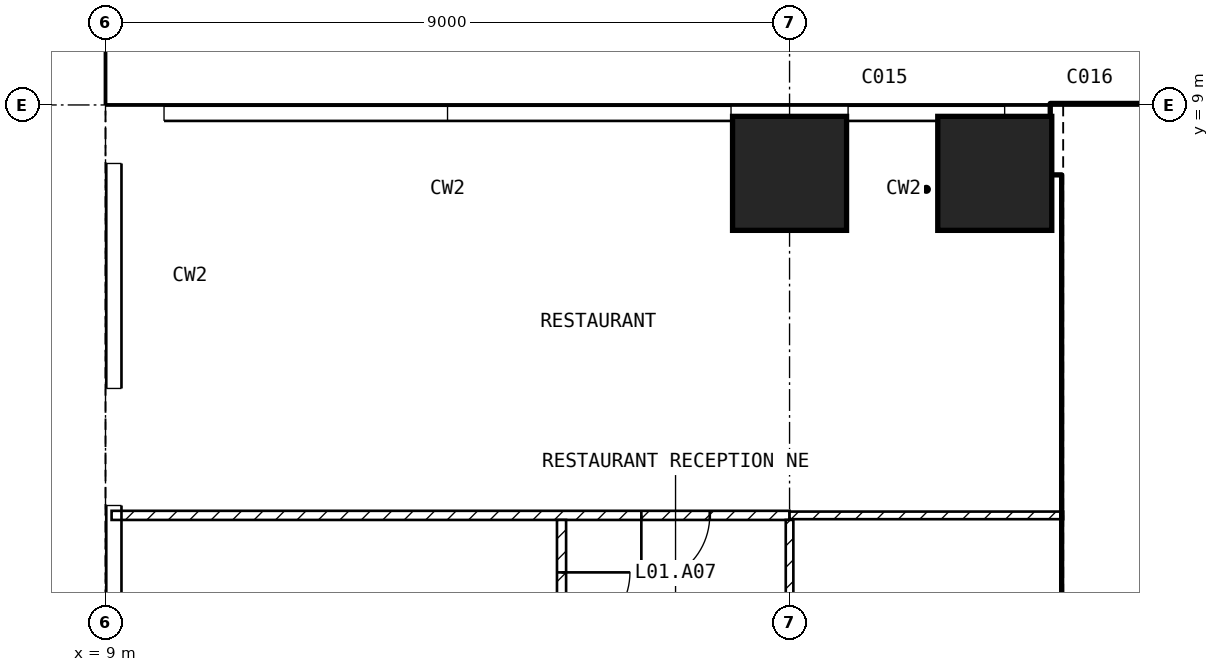
"""IFC4 building model, lengths in metres.
Left out: names, types, materials, properties, quantities, classifications, styles, units other than length and angle.
Written with IfcOpenShell. Run it as: python <this file> out.ifc"""

import sys

from ifc_helpers import new_model, si_unit, direction, frame, frame_2d, origin, origin_2d, place, context, subcontext, project, spatial, rectangle, extrude, element, fill, save


model = new_model("IFC4")
c1 = context("Model", 3, precision=1e-05, world=origin(), true_north=direction((0.0, 1.0)))
c2 = subcontext(c1, "Body", "Model", "MODEL_VIEW")
j1 = project(units=[si_unit("LENGTHUNIT", "METRE"), si_unit("PLANEANGLEUNIT", "RADIAN")], contexts=[c1])
p1 = place(None, origin())
s1 = spatial("IfcSite", under=j1, at=p1, CompositionType="ELEMENT")
p2 = place(p1, origin())
s2 = spatial("IfcBuilding", under=s1, at=p2, CompositionType="ELEMENT")
p3 = place(p2, origin())
s3 = spatial("IfcBuildingStorey", under=s2, at=p3, CompositionType="ELEMENT", Elevation=0.0)
p4 = place(p3, frame((7.65, -25.2, -0.4), z_axis=(0.0, 0.0, 1.0), x_axis=(0.0, 1.0, 0.0)))
e1 = element("IfcWall", 1, at=p4, inside=s3, PredefinedType="SOLIDWALL", context=c2, shape_type="SweptSolid", body=[
    extrude(rectangle(XDim=50.4, YDim=2.7, at=frame_2d((25.2, 0.0))), origin(), (0.0, 0.0, 1.0), 20.0),
])
p5 = place(p2, frame((0.0, 0.0, 15.0)))
s4 = spatial("IfcBuildingStorey", under=s2, at=p5, CompositionType="ELEMENT", Elevation=15.0)
for number, where, z_axis, x_axis in (
    (2, (18.0, 8.1, -0.3), (0.0, 0.0, 1.0), (1.0, 0.0, 0.0)),
    (3, (20.7, 8.1, -0.3), (0.0, 0.0, 1.0), (1.0, 0.0, 0.0)),
):
    element("IfcColumn", number, at=place(p5, frame(where, z_axis=z_axis, x_axis=x_axis)), inside=s4, PredefinedType="COLUMN", context=c2, shape_type="SweptSolid", body=[
        extrude(rectangle(XDim=1.5, YDim=1.5, at=origin_2d()), origin(), (0.0, 0.0, 1.0), 6.0),
    ])
p6 = place(p5, frame((21.45, 8.55, 0.0), z_axis=(0.0, 0.0, 1.0), x_axis=(1.0, 0.0, 0.0)))
e4 = element("IfcWall", 4, at=p6, inside=s4, PredefinedType="SHEAR", context=c2, shape_type="SweptSolid", body=[
    extrude(rectangle(XDim=10.05, YDim=0.9, at=frame_2d((5.025, 0.0))), origin(), (0.0, 0.0, 1.0), 5.7),
])
p7 = place(p5, frame((21.825, 1.2, 0.0), z_axis=(0.0, 0.0, 1.0), x_axis=(0.0, 1.0, 0.0)))
e5 = element("IfcWall", 5, at=p7, inside=s4, PredefinedType="SHEAR", context=c2, shape_type="SweptSolid", body=[
    extrude(rectangle(XDim=6.9, YDim=0.45, at=frame_2d((3.45, 0.0))), origin(), (0.0, 0.0, 1.0), 5.7),
])
p8 = place(p5, frame((22.05, 5.15, 0.0), z_axis=(0.0, 0.0, 1.0), x_axis=(1.0, 0.0, 0.0)))
e6 = element("IfcWall", 6, at=p8, inside=s4, PredefinedType="SOLIDWALL", context=c2, shape_type="SweptSolid", body=[
    extrude(rectangle(XDim=6.3, YDim=0.2, at=frame_2d((3.15, 0.0))), origin(), (0.0, 0.0, 1.0), 5.7),
])
p9 = place(p8, frame((0.2, 0.0, 0.0)))
e7 = element("IfcOpeningElement", 7, at=p9, cuts=e6, PredefinedType="OPENING", context=c2, shape_type="SweptSolid", body=[
    extrude(rectangle(XDim=1.0, YDim=2.1, at=frame_2d((0.5, 1.05))), frame((0.0, 0.11, 0.0), z_axis=(0.0, -1.0, 0.0), x_axis=(1.0, 0.0, 0.0)), (0.0, 0.0, 1.0), 0.22),
])
p10 = place(p5, frame((18.0, 3.6, 0.0), z_axis=(0.0, 0.0, 1.0), x_axis=(-1.0, 0.0, 0.0)))
e8 = element("IfcWall", 8, at=p10, inside=s4, PredefinedType="PARTITIONING", context=c2, shape_type="SweptSolid", body=[
    extrude(rectangle(XDim=8.92, YDim=0.12, at=frame_2d((4.46, 0.0))), origin(), (0.0, 0.0, 1.0), 5.7),
])
p11 = place(p10, frame((1.05, 0.0, 0.0)))
e9 = element("IfcOpeningElement", 9, at=p11, cuts=e8, PredefinedType="OPENING", context=c2, shape_type="SweptSolid", body=[
    extrude(rectangle(XDim=0.9, YDim=2.1, at=frame_2d((0.45, 1.05))), frame((0.0, 0.07, 0.0), z_axis=(0.0, -1.0, 0.0), x_axis=(1.0, 0.0, 0.0)), (0.0, 0.0, 1.0), 0.14),
])
p12 = place(p5, frame((21.6, 3.6, 0.0), z_axis=(0.0, 0.0, 1.0), x_axis=(-1.0, 0.0, 0.0)))
e10 = element("IfcWall", 10, at=p12, inside=s4, PredefinedType="PARTITIONING", context=c2, shape_type="SweptSolid", body=[
    extrude(rectangle(XDim=3.6, YDim=0.1, at=frame_2d((1.8, 0.0))), origin(), (0.0, 0.0, 1.0), 5.7),
])
p13 = place(p5, frame((15.0, 3.54, 0.0), z_axis=(0.0, 0.0, 1.0), x_axis=(0.0, -1.0, 0.0)))
e11 = element("IfcWall", 11, at=p13, inside=s4, PredefinedType="PARTITIONING", context=c2, shape_type="SweptSolid", body=[
    extrude(rectangle(XDim=2.28, YDim=0.12, at=frame_2d((1.14, 0.0))), origin(), (0.0, 0.0, 1.0), 5.7),
])
p14 = place(p13, frame((0.69, 0.0, 0.0)))
e12 = element("IfcOpeningElement", 12, at=p14, cuts=e11, PredefinedType="OPENING", context=c2, shape_type="SweptSolid", body=[
    extrude(rectangle(XDim=0.9, YDim=2.1, at=frame_2d((0.45, 1.05))), frame((0.0, 0.07, 0.0), z_axis=(0.0, -1.0, 0.0), x_axis=(1.0, 0.0, 0.0)), (0.0, 0.0, 1.0), 0.14),
])
p15 = place(p5, frame((18.0, 3.54, 0.0), z_axis=(0.0, 0.0, 1.0), x_axis=(0.0, -1.0, 0.0)))
e13 = element("IfcWall", 13, at=p15, inside=s4, PredefinedType="PARTITIONING", context=c2, shape_type="SweptSolid", body=[
    extrude(rectangle(XDim=2.28, YDim=0.1, at=frame_2d((1.14, 0.0))), origin(), (0.0, 0.0, 1.0), 4.61),
])
p16 = place(p9, origin())
e14 = element("IfcDoor", 14, at=p16, inside=s4, OperationType="SINGLE_SWING_LEFT", PredefinedType="DOOR", context=c2, shape_type="SweptSolid", body=[
    extrude(rectangle(XDim=1.0, YDim=2.1, at=frame_2d((0.5, 1.05))), frame((0.0, 0.025, 0.0), z_axis=(0.0, -1.0, 0.0), x_axis=(1.0, 0.0, 0.0)), (0.0, 0.0, 1.0), 0.05),
])
fill(e7, e14)
p17 = place(p11, origin())
e15 = element("IfcDoor", 15, at=p17, inside=s4, OperationType="SINGLE_SWING_RIGHT", PredefinedType="DOOR", context=c2, shape_type="SweptSolid", body=[
    extrude(rectangle(XDim=0.9, YDim=2.1, at=frame_2d((0.45, 1.05))), frame((0.0, 0.025, 0.0), z_axis=(0.0, -1.0, 0.0), x_axis=(1.0, 0.0, 0.0)), (0.0, 0.0, 1.0), 0.05),
])
fill(e9, e15)
p18 = place(p14, origin())
e16 = element("IfcDoor", 16, at=p18, inside=s4, OperationType="SINGLE_SWING_LEFT", PredefinedType="DOOR", context=c2, shape_type="SweptSolid", body=[
    extrude(rectangle(XDim=0.9, YDim=2.1, at=frame_2d((0.45, 1.05))), frame((0.0, 0.025, 0.0), z_axis=(0.0, -1.0, 0.0), x_axis=(1.0, 0.0, 0.0)), (0.0, 0.0, 1.0), 0.05),
])
fill(e12, e16)
save(model, sys.argv[1])
